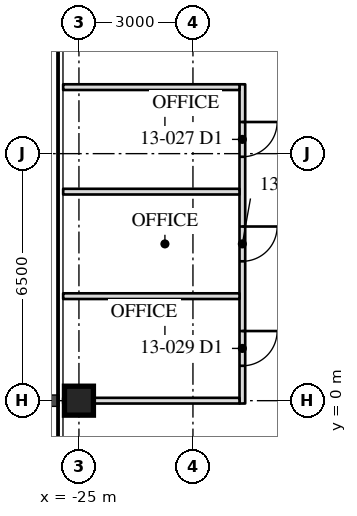
"""IFC4 building model, lengths in metres.
Left out: names, types, materials, properties, quantities, classifications, styles, units other than length and angle.
Written with IfcOpenShell. Run it as: python <this file> out.ifc"""

import sys

from ifc_helpers import new_model, si_unit, direction, frame, frame_2d, origin, origin_2d, place, context, subcontext, project, spatial, rectangle, hollow_rectangle, extrude, element, fill, save


model = new_model("IFC4")
c1 = context("Model", 3, precision=1e-05, world=origin(), true_north=direction((0.0, 1.0)))
c2 = subcontext(c1, "Body", "Model", "MODEL_VIEW")
j1 = project(units=[si_unit("LENGTHUNIT", "METRE"), si_unit("PLANEANGLEUNIT", "RADIAN")], contexts=[c1])
p1 = place(None, origin())
s1 = spatial("IfcSite", under=j1, at=p1, CompositionType="ELEMENT")
p2 = place(p1, origin())
s2 = spatial("IfcBuilding", under=s1, at=p2, CompositionType="ELEMENT")
p3 = place(p2, frame((0.0, 0.0, 57.0)))
s3 = spatial("IfcBuildingStorey", under=s2, at=p3, CompositionType="ELEMENT", Elevation=57.0)
p4 = place(p3, frame((-25.0, 0.0, 0.0), z_axis=(0.0, 0.0, 1.0), x_axis=(0.0, 1.0, 0.0)))
e1 = element("IfcColumn", 1, at=p4, inside=s3, PredefinedType="COLUMN", context=c2, shape_type="SweptSolid", body=[
    extrude(hollow_rectangle(XDim=0.762, YDim=0.762, WallThickness=0.127, at=origin_2d()), origin(), (0.0, 0.0, 1.0), 4.1),
])
p5 = place(p3, frame((-20.7, 8.325, 0.0), z_axis=(0.0, 0.0, 1.0), x_axis=(0.0, -1.0, 0.0)))
e2 = element("IfcWall", 2, at=p5, inside=s3, PredefinedType="PARTITIONING", context=c2, shape_type="SweptSolid", body=[
    extrude(rectangle(XDim=8.4, YDim=0.15, at=frame_2d((4.2, 0.0))), origin(), (0.0, 0.0, 1.0), 3.91),
])
p6 = place(p5, frame((0.992, 0.0, 0.0)))
e3 = element("IfcOpeningElement", 3, at=p6, cuts=e2, PredefinedType="OPENING", context=c2, shape_type="SweptSolid", body=[
    extrude(rectangle(XDim=0.915, YDim=2.134, at=frame_2d((0.458, 1.067))), frame((0.0, 0.085, 0.0), z_axis=(0.0, -1.0, 0.0), x_axis=(1.0, 0.0, 0.0)), (0.0, 0.0, 1.0), 0.17),
])
p7 = place(p5, frame((3.742, 0.0, 0.0)))
e4 = element("IfcOpeningElement", 4, at=p7, cuts=e2, PredefinedType="OPENING", context=c2, shape_type="SweptSolid", body=[
    extrude(rectangle(XDim=0.915, YDim=2.134, at=frame_2d((0.458, 1.067))), frame((0.0, 0.085, 0.0), z_axis=(0.0, -1.0, 0.0), x_axis=(1.0, 0.0, 0.0)), (0.0, 0.0, 1.0), 0.17),
])
p8 = place(p5, frame((6.492, 0.0, 0.0)))
e5 = element("IfcOpeningElement", 5, at=p8, cuts=e2, PredefinedType="OPENING", context=c2, shape_type="SweptSolid", body=[
    extrude(rectangle(XDim=0.915, YDim=2.134, at=frame_2d((0.458, 1.067))), frame((0.0, 0.085, 0.0), z_axis=(0.0, -1.0, 0.0), x_axis=(1.0, 0.0, 0.0)), (0.0, 0.0, 1.0), 0.17),
])
for number, where, z_axis, x_axis in (
    (6, (-20.775, 8.25, 0.0), (0.0, 0.0, 1.0), (-1.0, 0.0, 0.0)),
    (7, (-20.775, 5.5, 0.0), (0.0, 0.0, 1.0), (-1.0, 0.0, 0.0)),
    (8, (-20.775, 2.75, 0.0), (0.0, 0.0, 1.0), (-1.0, 0.0, 0.0)),
):
    element("IfcWall", number, at=place(p3, frame(where, z_axis=z_axis, x_axis=x_axis)), inside=s3, PredefinedType="PARTITIONING", context=c2, shape_type="SweptSolid", body=[
        extrude(rectangle(XDim=4.64, YDim=0.15, at=frame_2d((2.32, 0.0))), origin(), (0.0, 0.0, 1.0), 3.91),
    ])
p9 = place(p3, frame((-20.775, 0.0, 0.0), z_axis=(0.0, 0.0, 1.0), x_axis=(-1.0, 0.0, 0.0)))
e9 = element("IfcWall", 9, at=p9, inside=s3, PredefinedType="PARTITIONING", context=c2, shape_type="SweptSolid", body=[
    extrude(rectangle(XDim=4.64, YDim=0.15, at=frame_2d((2.32, 0.0))), origin(), (0.0, 0.0, 1.0), 3.13),
])
p10 = place(p6, origin())
e10 = element("IfcDoor", 10, at=p10, inside=s3, OperationType="SINGLE_SWING_LEFT", PredefinedType="DOOR", context=c2, shape_type="SweptSolid", body=[
    extrude(rectangle(XDim=0.915, YDim=2.134, at=frame_2d((0.458, 1.067))), frame((0.0, 0.025, 0.0), z_axis=(0.0, -1.0, 0.0), x_axis=(1.0, 0.0, 0.0)), (0.0, 0.0, 1.0), 0.05),
])
fill(e3, e10)
p11 = place(p7, origin())
e11 = element("IfcDoor", 11, at=p11, inside=s3, OperationType="SINGLE_SWING_LEFT", PredefinedType="DOOR", context=c2, shape_type="SweptSolid", body=[
    extrude(rectangle(XDim=0.915, YDim=2.134, at=frame_2d((0.458, 1.067))), frame((0.0, 0.025, 0.0), z_axis=(0.0, -1.0, 0.0), x_axis=(1.0, 0.0, 0.0)), (0.0, 0.0, 1.0), 0.05),
])
fill(e4, e11)
p12 = place(p8, origin())
e12 = element("IfcDoor", 12, at=p12, inside=s3, OperationType="SINGLE_SWING_LEFT", PredefinedType="DOOR", context=c2, shape_type="SweptSolid", body=[
    extrude(rectangle(XDim=0.915, YDim=2.134, at=frame_2d((0.458, 1.067))), frame((0.0, 0.025, 0.0), z_axis=(0.0, -1.0, 0.0), x_axis=(1.0, 0.0, 0.0)), (0.0, 0.0, 1.0), 0.05),
])
fill(e5, e12)
save(model, sys.argv[1])
